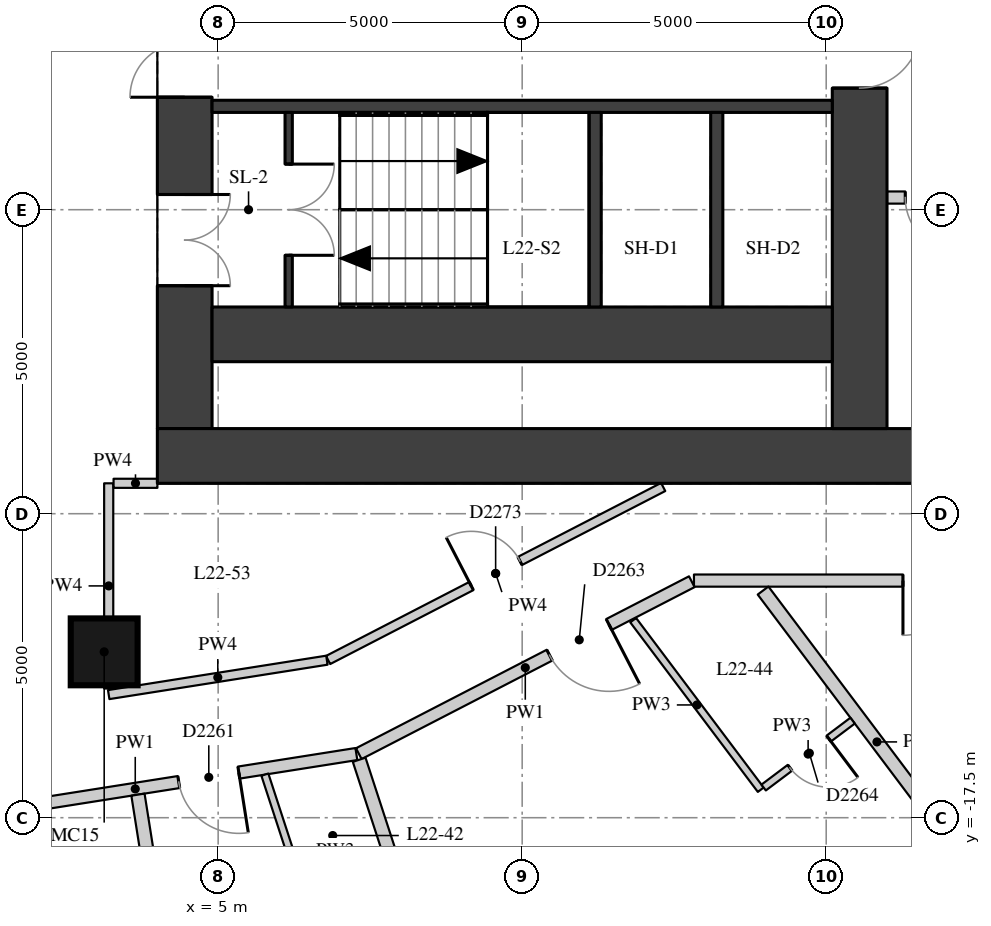
"""IFC4 building model, lengths in metres.
Left out: names, types, materials, properties, quantities, classifications, styles, units other than length and angle.
Written with IfcOpenShell. Run it as: python <this file> out.ifc"""

import sys

from ifc_helpers import new_model, si_unit, direction, frame, frame_2d, origin, origin_2d, place, context, subcontext, project, spatial, rectangle, extrude, element, fill, save


model = new_model("IFC4")
c1 = context("Model", 3, precision=1e-05, world=origin(), true_north=direction((0.0, 1.0)))
c2 = subcontext(c1, "Body", "Model", "MODEL_VIEW")
j1 = project(units=[si_unit("LENGTHUNIT", "METRE"), si_unit("PLANEANGLEUNIT", "RADIAN")], contexts=[c1])
p1 = place(None, origin())
s1 = spatial("IfcSite", under=j1, at=p1, CompositionType="ELEMENT")
p2 = place(p1, origin())
s2 = spatial("IfcBuilding", under=s1, at=p2, CompositionType="ELEMENT")
p3 = place(p2, frame((0.0, 0.0, 81.1)))
s3 = spatial("IfcBuildingStorey", under=s2, at=p3, CompositionType="ELEMENT", Elevation=81.1)
p4 = place(p3, frame((3.126, -14.772, 0.0), z_axis=(0.0, 0.0, 1.0), x_axis=(1.0, 0.0, 0.0)))
e1 = element("IfcColumn", 1, at=p4, inside=s3, PredefinedType="COLUMN", context=c2, shape_type="SweptSolid", body=[
    extrude(rectangle(XDim=1.1, YDim=1.1, at=origin_2d()), origin(), (0.0, 0.0, 1.0), 3.3),
])
p5 = place(p3, frame((4.45, -11.1, 0.0), z_axis=(0.0, 0.0, 1.0), x_axis=(0.0, 1.0, 0.0)))
e2 = element("IfcWall", 2, at=p5, inside=s3, PredefinedType="SHEAR", context=c2, shape_type="SweptSolid", body=[
    extrude(rectangle(XDim=22.2, YDim=0.9, at=frame_2d((11.1, 0.0))), origin(), (0.0, 0.0, 1.0), 2.85),
])
p6 = place(p5, frame((2.35, 0.0, 0.0)))
e3 = element("IfcOpeningElement", 3, at=p6, cuts=e2, PredefinedType="OPENING", context=c2, shape_type="SweptSolid", body=[
    extrude(rectangle(XDim=1.5, YDim=2.1, at=frame_2d((0.75, 1.05))), frame((0.0, 0.46, 0.0), z_axis=(0.0, -1.0, 0.0), x_axis=(1.0, 0.0, 0.0)), (0.0, 0.0, 1.0), 0.92),
])
p7 = place(p5, frame((5.45, 0.0, 0.0)))
e4 = element("IfcOpeningElement", 4, at=p7, cuts=e2, PredefinedType="OPENING", context=c2, shape_type="SweptSolid", body=[
    extrude(rectangle(XDim=1.8, YDim=2.1, at=frame_2d((0.9, 1.05))), frame((0.0, 0.46, 0.0), z_axis=(0.0, -1.0, 0.0), x_axis=(1.0, 0.0, 0.0)), (0.0, 0.0, 1.0), 0.92),
])
p8 = place(p5, frame((7.95, 0.0, 0.0)))
e5 = element("IfcOpeningElement", 5, at=p8, cuts=e2, PredefinedType="OPENING", context=c2, shape_type="SweptSolid", body=[
    extrude(rectangle(XDim=1.1, YDim=2.1, at=frame_2d((0.55, 1.05))), frame((0.0, 0.46, 0.0), z_axis=(0.0, -1.0, 0.0), x_axis=(1.0, 0.0, 0.0)), (0.0, 0.0, 1.0), 0.92),
])
p9 = place(p5, frame((10.6, 0.0, 0.0)))
e6 = element("IfcOpeningElement", 6, at=p9, cuts=e2, PredefinedType="OPENING", context=c2, shape_type="SweptSolid", body=[
    extrude(rectangle(XDim=1.0, YDim=2.1, at=frame_2d((0.5, 1.05))), frame((0.0, 0.46, 0.0), z_axis=(0.0, -1.0, 0.0), x_axis=(1.0, 0.0, 0.0)), (0.0, 0.0, 1.0), 0.92),
])
p10 = place(p5, frame((13.15, 0.0, 0.0)))
e7 = element("IfcOpeningElement", 7, at=p10, cuts=e2, PredefinedType="OPENING", context=c2, shape_type="SweptSolid", body=[
    extrude(rectangle(XDim=1.1, YDim=2.1, at=frame_2d((0.55, 1.05))), frame((0.0, 0.46, 0.0), z_axis=(0.0, -1.0, 0.0), x_axis=(1.0, 0.0, 0.0)), (0.0, 0.0, 1.0), 0.92),
])
p11 = place(p5, frame((14.95, 0.0, 0.0)))
e8 = element("IfcOpeningElement", 8, at=p11, cuts=e2, PredefinedType="OPENING", context=c2, shape_type="SweptSolid", body=[
    extrude(rectangle(XDim=1.8, YDim=2.1, at=frame_2d((0.9, 1.05))), frame((0.0, 0.46, 0.0), z_axis=(0.0, -1.0, 0.0), x_axis=(1.0, 0.0, 0.0)), (0.0, 0.0, 1.0), 0.92),
])
p12 = place(p5, frame((18.35, 0.0, 0.0)))
e9 = element("IfcOpeningElement", 9, at=p12, cuts=e2, PredefinedType="OPENING", context=c2, shape_type="SweptSolid", body=[
    extrude(rectangle(XDim=1.5, YDim=2.1, at=frame_2d((0.75, 1.05))), frame((0.0, 0.46, 0.0), z_axis=(0.0, -1.0, 0.0), x_axis=(1.0, 0.0, 0.0)), (0.0, 0.0, 1.0), 0.92),
])
p13 = place(p3, frame((4.0, -11.55, 0.0), z_axis=(0.0, 0.0, 1.0), x_axis=(1.0, 0.0, 0.0)))
e10 = element("IfcWall", 10, at=p13, inside=s3, PredefinedType="SHEAR", context=c2, shape_type="SweptSolid", body=[
    extrude(rectangle(XDim=15.2, YDim=0.9, at=frame_2d((7.6, 0.0))), origin(), (0.0, 0.0, 1.0), 2.85),
])
p14 = place(p3, frame((15.55, -11.1, 0.0), z_axis=(0.0, 0.0, 1.0), x_axis=(0.0, 1.0, 0.0)))
e11 = element("IfcWall", 11, at=p14, inside=s3, PredefinedType="SHEAR", context=c2, shape_type="SweptSolid", body=[
    extrude(rectangle(XDim=22.2, YDim=0.9, at=frame_2d((11.1, 0.0))), origin(), (0.0, 0.0, 1.0), 2.85),
])
p15 = place(p14, frame((15.6, 0.0, 0.0)))
e12 = element("IfcOpeningElement", 12, at=p15, cuts=e11, PredefinedType="OPENING", context=c2, shape_type="SweptSolid", body=[
    extrude(rectangle(XDim=1.0, YDim=2.1, at=frame_2d((0.5, 1.05))), frame((0.0, 0.46, 0.0), z_axis=(0.0, -1.0, 0.0), x_axis=(1.0, 0.0, 0.0)), (0.0, 0.0, 1.0), 0.92),
])
p16 = place(p14, frame((5.6, 0.0, 0.0)))
e13 = element("IfcOpeningElement", 13, at=p16, cuts=e11, PredefinedType="OPENING", context=c2, shape_type="SweptSolid", body=[
    extrude(rectangle(XDim=1.0, YDim=2.1, at=frame_2d((0.5, 1.05))), frame((0.0, 0.46, 0.0), z_axis=(0.0, -1.0, 0.0), x_axis=(1.0, 0.0, 0.0)), (0.0, 0.0, 1.0), 0.92),
])
p17 = place(p3, frame((4.9, -9.55, 0.0), z_axis=(0.0, 0.0, 1.0), x_axis=(1.0, 0.0, 0.0)))
e14 = element("IfcWall", 14, at=p17, inside=s3, PredefinedType="SHEAR", context=c2, shape_type="SweptSolid", body=[
    extrude(rectangle(XDim=10.2, YDim=0.9, at=frame_2d((5.1, 0.0))), origin(), (0.0, 0.0, 1.0), 2.85),
])
p18 = place(p3, frame((4.9, -5.8, 0.0), z_axis=(0.0, 0.0, 1.0), x_axis=(1.0, 0.0, 0.0)))
e15 = element("IfcWall", 15, at=p18, inside=s3, PredefinedType="SHEAR", context=c2, shape_type="SweptSolid", body=[
    extrude(rectangle(XDim=10.2, YDim=0.2, at=frame_2d((5.1, 0.0))), origin(), (0.0, 0.0, 1.0), 2.85),
])
for number, where, z_axis, x_axis in (
    (16, (11.2, -9.1, 0.0), (0.0, 0.0, 1.0), (0.0, 1.0, 0.0)),
    (17, (13.2, -9.1, 0.0), (0.0, 0.0, 1.0), (0.0, 1.0, 0.0)),
):
    element("IfcWall", number, at=place(p3, frame(where, z_axis=z_axis, x_axis=x_axis)), inside=s3, PredefinedType="SHEAR", context=c2, shape_type="SweptSolid", body=[
        extrude(rectangle(XDim=3.2, YDim=0.2, at=frame_2d((1.6, 0.0))), origin(), (0.0, 0.0, 1.0), 2.85),
    ])
p19 = place(p3, frame((6.16, -9.1, 0.0), z_axis=(0.0, 0.0, 1.0), x_axis=(0.0, 1.0, 0.0)))
e18 = element("IfcWall", 18, at=p19, inside=s3, PredefinedType="SHEAR", context=c2, shape_type="SweptSolid", body=[
    extrude(rectangle(XDim=3.2, YDim=0.12, at=frame_2d((1.6, 0.0))), origin(), (0.0, 0.0, 1.0), 2.85),
])
p20 = place(p19, frame((0.85, 0.0, 0.0)))
e19 = element("IfcOpeningElement", 19, at=p20, cuts=e18, PredefinedType="OPENING", context=c2, shape_type="SweptSolid", body=[
    extrude(rectangle(XDim=1.5, YDim=2.1, at=frame_2d((0.75, 1.05))), frame((0.0, 0.07, 0.0), z_axis=(0.0, -1.0, 0.0), x_axis=(1.0, 0.0, 0.0)), (0.0, 0.0, 1.0), 0.14),
])
p21 = place(p3, frame((16.0, -7.3, 0.0), z_axis=(0.0, 0.0, 1.0), x_axis=(1.0, 0.0, 0.0)))
e20 = element("IfcWall", 20, at=p21, inside=s3, PredefinedType="PARTITIONING", context=c2, shape_type="SweptSolid", body=[
    extrude(rectangle(XDim=2.3, YDim=0.2, at=frame_2d((1.15, 0.0))), origin(), (0.0, 0.0, 1.0), 2.85),
])
p22 = place(p21, frame((0.3, 0.0, 0.0)))
e21 = element("IfcOpeningElement", 21, at=p22, cuts=e20, PredefinedType="OPENING", context=c2, shape_type="SweptSolid", body=[
    extrude(rectangle(XDim=0.9, YDim=2.1, at=frame_2d((0.45, 1.05))), frame((0.0, 0.11, 0.0), z_axis=(0.0, -1.0, 0.0), x_axis=(1.0, 0.0, 0.0)), (0.0, 0.0, 1.0), 0.22),
])
p23 = place(p3, frame((20.7, -13.6, 0.0), z_axis=(0.0, 0.0, 1.0), x_axis=(-1.0, 0.0, 0.0)))
e22 = element("IfcWall", 22, at=p23, inside=s3, PredefinedType="PARTITIONING", context=c2, shape_type="SweptSolid", body=[
    extrude(rectangle(XDim=7.875, YDim=0.2, at=frame_2d((3.938, 0.0))), origin(), (0.0, 0.0, 1.0), 2.85),
])
p24 = place(p23, frame((2.638, 0.0, 0.0)))
e23 = element("IfcOpeningElement", 23, at=p24, cuts=e22, PredefinedType="OPENING", context=c2, shape_type="SweptSolid", body=[
    extrude(rectangle(XDim=1.8, YDim=2.1, at=frame_2d((0.9, 1.05))), frame((0.0, 0.11, 0.0), z_axis=(0.0, -1.0, 0.0), x_axis=(1.0, 0.0, 0.0)), (0.0, 0.0, 1.0), 0.22),
])
p25 = place(p3, frame((12.79, -13.619, 0.0), z_axis=(0.0, 0.0, 1.0), x_axis=(-0.888545137607, -0.458789209152, 0.0)))
e24 = element("IfcWall", 24, at=p25, inside=s3, PredefinedType="PARTITIONING", context=c2, shape_type="SweptSolid", body=[
    extrude(rectangle(XDim=6.164, YDim=0.2, at=frame_2d((3.082, 0.0))), origin(), (0.0, 0.0, 1.0), 2.85),
])
p26 = place(p25, frame((1.533, 0.0, 0.0)))
e25 = element("IfcOpeningElement", 25, at=p26, cuts=e24, PredefinedType="OPENING", context=c2, shape_type="SweptSolid", body=[
    extrude(rectangle(XDim=1.1, YDim=2.1, at=frame_2d((0.55, 1.05))), frame((0.0, 0.11, 0.0), z_axis=(0.0, -1.0, 0.0), x_axis=(1.0, 0.0, 0.0)), (0.0, 0.0, 1.0), 0.22),
])
p27 = place(p3, frame((7.273, -16.453, 0.0), z_axis=(0.0, 0.0, 1.0), x_axis=(-0.987787686426, -0.155805925901, 0.0)))
e26 = element("IfcWall", 26, at=p27, inside=s3, PredefinedType="PARTITIONING", context=c2, shape_type="SweptSolid", body=[
    extrude(rectangle(XDim=7.363, YDim=0.2, at=frame_2d((3.682, 0.0))), origin(), (0.0, 0.0, 1.0), 2.85),
])
p28 = place(p27, frame((5.161, 0.0, 0.0)))
e27 = element("IfcOpeningElement", 27, at=p28, cuts=e26, PredefinedType="OPENING", context=c2, shape_type="SweptSolid", body=[
    extrude(rectangle(XDim=0.9, YDim=2.1, at=frame_2d((0.45, 1.05))), frame((0.0, 0.11, 0.0), z_axis=(0.0, -1.0, 0.0), x_axis=(1.0, 0.0, 0.0)), (0.0, 0.0, 1.0), 0.22),
])
p29 = place(p27, frame((1.957, 0.0, 0.0)))
e28 = element("IfcOpeningElement", 28, at=p29, cuts=e26, PredefinedType="OPENING", context=c2, shape_type="SweptSolid", body=[
    extrude(rectangle(XDim=1.0, YDim=2.1, at=frame_2d((0.5, 1.05))), frame((0.0, 0.11, 0.0), z_axis=(0.0, -1.0, 0.0), x_axis=(1.0, 0.0, 0.0)), (0.0, 0.0, 1.0), 0.22),
])
p30 = place(p3, frame((12.319, -12.061, 0.0), z_axis=(0.0, 0.0, 1.0), x_axis=(-0.888525413766, -0.458827406648, 0.0)))
e29 = element("IfcWall", 29, at=p30, inside=s3, PredefinedType="PARTITIONING", context=c2, shape_type="SweptSolid", body=[
    extrude(rectangle(XDim=6.202, YDim=0.15, at=frame_2d((3.101, 0.0))), origin(), (0.0, 0.0, 1.0), 2.85),
])
p31 = place(p30, frame((2.651, 0.0, 0.0)))
e30 = element("IfcOpeningElement", 30, at=p31, cuts=e29, PredefinedType="OPENING", context=c2, shape_type="SweptSolid", body=[
    extrude(rectangle(XDim=0.9, YDim=2.1, at=frame_2d((0.45, 1.05))), frame((0.0, 0.085, 0.0), z_axis=(0.0, -1.0, 0.0), x_axis=(1.0, 0.0, 0.0)), (0.0, 0.0, 1.0), 0.17),
])
p32 = place(p3, frame((6.788, -14.909, 0.0), z_axis=(0.0, 0.0, 1.0), x_axis=(-0.987791284458, -0.15578311317, 0.0)))
e31 = element("IfcWall", 31, at=p32, inside=s3, PredefinedType="PARTITIONING", context=c2, shape_type="SweptSolid", body=[
    extrude(rectangle(XDim=3.633, YDim=0.15, at=frame_2d((1.816, 0.0))), origin(), (0.0, 0.0, 1.0), 2.85),
])
p33 = place(p3, frame((3.2, -15.375, 0.0), z_axis=(0.0, 0.0, 1.0), x_axis=(0.0, 1.0, 0.0)))
e32 = element("IfcWall", 32, at=p33, inside=s3, PredefinedType="PARTITIONING", context=c2, shape_type="SweptSolid", body=[
    extrude(rectangle(XDim=3.375, YDim=0.15, at=frame_2d((1.688, 0.0))), origin(), (0.0, 0.0, 1.0), 2.85),
])
p34 = place(p3, frame((3.28, -12.0, 0.0), z_axis=(0.0, 0.0, 1.0), x_axis=(1.0, 0.0, 0.0)))
e33 = element("IfcWall", 33, at=p34, inside=s3, PredefinedType="PARTITIONING", context=c2, shape_type="SweptSolid", body=[
    extrude(rectangle(XDim=0.721, YDim=0.15, at=frame_2d((0.36, 0.0))), origin(), (0.0, 0.0, 1.0), 2.85),
])
p35 = place(p3, frame((4.788, -24.125, 0.0), z_axis=(0.0, 0.0, 1.0), x_axis=(-0.156119905599, 0.987738110572, 0.0)))
e34 = element("IfcWall", 34, at=p35, inside=s3, PredefinedType="PARTITIONING", context=c2, shape_type="SweptSolid", body=[
    extrude(rectangle(XDim=7.092, YDim=0.22, at=frame_2d((3.546, 0.0))), origin(), (0.0, 0.0, 1.0), 2.3),
])
p36 = place(p3, frame((9.429, -23.014, 0.0), z_axis=(0.0, 0.0, 1.0), x_axis=(-0.310213813997, 0.95066681314, 0.0)))
e35 = element("IfcWall", 35, at=p36, inside=s3, PredefinedType="PARTITIONING", context=c2, shape_type="SweptSolid", body=[
    extrude(rectangle(XDim=6.803, YDim=0.22, at=frame_2d((3.401, 0.0))), origin(), (0.0, 0.0, 1.0), 2.85),
])
p37 = place(p3, frame((17.708, -18.743, 0.0), z_axis=(0.0, 0.0, 1.0), x_axis=(-0.601177883261, 0.799115231164, 0.0)))
e36 = element("IfcWall", 36, at=p37, inside=s3, PredefinedType="PARTITIONING", context=c2, shape_type="SweptSolid", body=[
    extrude(rectangle(XDim=6.231, YDim=0.22, at=frame_2d((3.116, 0.0))), origin(), (0.0, 0.0, 1.0), 2.85),
])
p38 = place(p3, frame((5.768, -16.792, 0.0), z_axis=(0.0, 0.0, 1.0), x_axis=(0.310272506556, -0.950647659059, 0.0)))
e37 = element("IfcWall", 37, at=p38, inside=s3, PredefinedType="PARTITIONING", context=c2, shape_type="SweptSolid", body=[
    extrude(rectangle(XDim=2.647, YDim=0.12, at=frame_2d((1.323, 0.0))), origin(), (0.0, 0.0, 1.0), 2.85),
])
p39 = place(p3, frame((11.825, -14.251, 0.0), z_axis=(0.0, 0.0, 1.0), x_axis=(0.601196964615, -0.799100875821, 0.0)))
e38 = element("IfcWall", 38, at=p39, inside=s3, PredefinedType="PARTITIONING", context=c2, shape_type="SweptSolid", body=[
    extrude(rectangle(XDim=3.49, YDim=0.12, at=frame_2d((1.745, 0.0))), origin(), (0.0, 0.0, 1.0), 2.85),
])
p40 = place(p3, frame((13.971, -17.004, 0.0), z_axis=(0.0, 0.0, 1.0), x_axis=(0.799231057954, 0.60102388971, 0.0)))
e39 = element("IfcWall", 39, at=p40, inside=s3, PredefinedType="PARTITIONING", context=c2, shape_type="SweptSolid", body=[
    extrude(rectangle(XDim=1.83, YDim=0.12, at=frame_2d((0.915, 0.0))), origin(), (0.0, 0.0, 1.0), 2.85),
])
p41 = place(p40, frame((0.54, 0.0, 0.0)))
e40 = element("IfcOpeningElement", 40, at=p41, cuts=e39, PredefinedType="OPENING", context=c2, shape_type="SweptSolid", body=[
    extrude(rectangle(XDim=0.8, YDim=2.1, at=frame_2d((0.4, 1.05))), frame((0.0, 0.07, 0.0), z_axis=(0.0, -1.0, 0.0), x_axis=(1.0, 0.0, 0.0)), (0.0, 0.0, 1.0), 0.14),
])
p42 = place(p6, origin())
e41 = element("IfcDoor", 41, at=p42, inside=s3, OperationType="DOUBLE_DOOR_SINGLE_SWING", PredefinedType="DOOR", context=c2, shape_type="SweptSolid", body=[
    extrude(rectangle(XDim=1.5, YDim=2.1, at=frame_2d((0.75, 1.05))), frame((0.0, 0.025, 0.0), z_axis=(0.0, -1.0, 0.0), x_axis=(1.0, 0.0, 0.0)), (0.0, 0.0, 1.0), 0.05),
])
fill(e3, e41)
p43 = place(p7, origin())
e42 = element("IfcDoor", 42, at=p43, inside=s3, OperationType="DOUBLE_DOOR_SINGLE_SWING", PredefinedType="DOOR", context=c2, shape_type="SweptSolid", body=[
    extrude(rectangle(XDim=1.8, YDim=2.1, at=frame_2d((0.9, 1.05))), frame((0.0, 0.025, 0.0), z_axis=(0.0, -1.0, 0.0), x_axis=(1.0, 0.0, 0.0)), (0.0, 0.0, 1.0), 0.05),
])
fill(e4, e42)
p44 = place(p20, origin())
e43 = element("IfcDoor", 43, at=p44, inside=s3, OperationType="DOUBLE_DOOR_SINGLE_SWING", PredefinedType="DOOR", context=c2, shape_type="SweptSolid", body=[
    extrude(rectangle(XDim=1.5, YDim=2.1, at=frame_2d((0.75, 1.05))), frame((0.0, 0.025, 0.0), z_axis=(0.0, -1.0, 0.0), x_axis=(1.0, 0.0, 0.0)), (0.0, 0.0, 1.0), 0.05),
])
fill(e19, e43)
p45 = place(p16, origin())
e44 = element("IfcDoor", 44, at=p45, inside=s3, OperationType="SINGLE_SWING_LEFT", PredefinedType="DOOR", context=c2, shape_type="SweptSolid", body=[
    extrude(rectangle(XDim=1.0, YDim=2.1, at=frame_2d((0.5, 1.05))), frame((0.0, 0.025, 0.0), z_axis=(0.0, -1.0, 0.0), x_axis=(1.0, 0.0, 0.0)), (0.0, 0.0, 1.0), 0.05),
])
fill(e13, e44)
p46 = place(p22, origin())
e45 = element("IfcDoor", 45, at=p46, inside=s3, OperationType="SINGLE_SWING_LEFT", PredefinedType="DOOR", context=c2, shape_type="SweptSolid", body=[
    extrude(rectangle(XDim=0.9, YDim=2.1, at=frame_2d((0.45, 1.05))), frame((0.0, 0.025, 0.0), z_axis=(0.0, -1.0, 0.0), x_axis=(1.0, 0.0, 0.0)), (0.0, 0.0, 1.0), 0.05),
])
fill(e21, e45)
p47 = place(p29, origin())
e46 = element("IfcDoor", 46, at=p47, inside=s3, OperationType="SINGLE_SWING_LEFT", PredefinedType="DOOR", context=c2, shape_type="SweptSolid", body=[
    extrude(rectangle(XDim=1.0, YDim=2.1, at=frame_2d((0.5, 1.05))), frame((0.0, 0.025, 0.0), z_axis=(0.0, -1.0, 0.0), x_axis=(1.0, 0.0, 0.0)), (0.0, 0.0, 1.0), 0.05),
])
fill(e28, e46)
p48 = place(p26, origin())
e47 = element("IfcDoor", 47, at=p48, inside=s3, OperationType="SINGLE_SWING_LEFT", PredefinedType="DOOR", context=c2, shape_type="SweptSolid", body=[
    extrude(rectangle(XDim=1.1, YDim=2.1, at=frame_2d((0.55, 1.05))), frame((0.0, 0.025, 0.0), z_axis=(0.0, -1.0, 0.0), x_axis=(1.0, 0.0, 0.0)), (0.0, 0.0, 1.0), 0.05),
])
fill(e25, e47)
p49 = place(p41, origin())
e48 = element("IfcDoor", 48, at=p49, inside=s3, OperationType="SINGLE_SWING_LEFT", PredefinedType="DOOR", context=c2, shape_type="SweptSolid", body=[
    extrude(rectangle(XDim=0.8, YDim=2.1, at=frame_2d((0.4, 1.05))), frame((0.0, 0.025, 0.0), z_axis=(0.0, -1.0, 0.0), x_axis=(1.0, 0.0, 0.0)), (0.0, 0.0, 1.0), 0.05),
])
fill(e40, e48)
p50 = place(p24, origin())
e49 = element("IfcDoor", 49, at=p50, inside=s3, OperationType="DOUBLE_DOOR_SINGLE_SWING", PredefinedType="DOOR", context=c2, shape_type="SweptSolid", body=[
    extrude(rectangle(XDim=1.8, YDim=2.1, at=frame_2d((0.9, 1.05))), frame((0.0, 0.025, 0.0), z_axis=(0.0, -1.0, 0.0), x_axis=(1.0, 0.0, 0.0)), (0.0, 0.0, 1.0), 0.05),
])
fill(e23, e49)
p51 = place(p31, origin())
e50 = element("IfcDoor", 50, at=p51, inside=s3, OperationType="SINGLE_SWING_LEFT", PredefinedType="DOOR", context=c2, shape_type="SweptSolid", body=[
    extrude(rectangle(XDim=0.9, YDim=2.1, at=frame_2d((0.45, 1.05))), frame((0.0, 0.025, 0.0), z_axis=(0.0, -1.0, 0.0), x_axis=(1.0, 0.0, 0.0)), (0.0, 0.0, 1.0), 0.05),
])
fill(e30, e50)
save(model, sys.argv[1])
